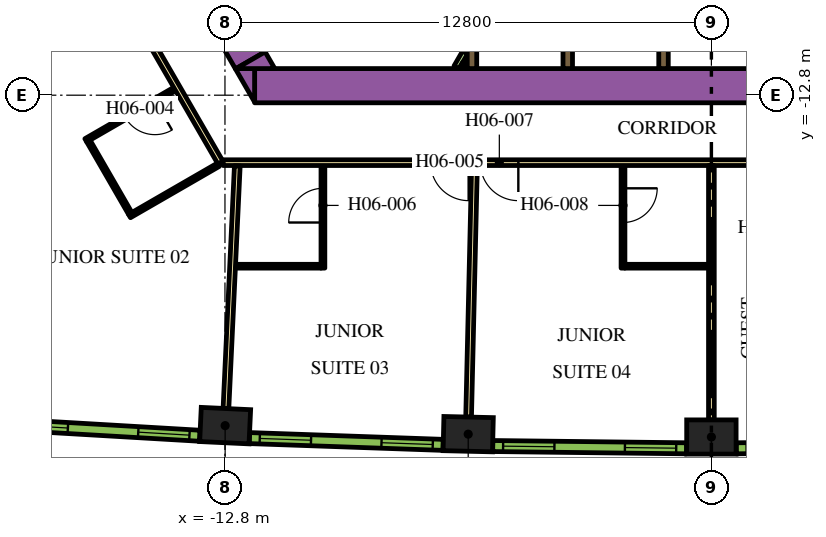
"""IFC4 building model, lengths in metres.
Left out: names, types, materials, properties, quantities, classifications, styles, units other than length and angle.
Written with IfcOpenShell. Run it as: python <this file> out.ifc"""

import sys

from ifc_helpers import new_model, si_unit, direction, frame, frame_2d, origin, origin_2d, place, context, subcontext, project, spatial, polyline, rectangle, outline, extrude, element, fill, save


model = new_model("IFC4")
c1 = context("Model", 3, precision=1e-05, world=origin(), true_north=direction((0.0, 1.0)))
c2 = subcontext(c1, "Body", "Model", "MODEL_VIEW")
j1 = project(units=[si_unit("LENGTHUNIT", "METRE"), si_unit("PLANEANGLEUNIT", "RADIAN")], contexts=[c1])
p1 = place(None, origin())
s1 = spatial("IfcSite", under=j1, at=p1, CompositionType="ELEMENT")
p2 = place(p1, origin())
s2 = spatial("IfcBuilding", under=s1, at=p2, CompositionType="ELEMENT")
p3 = place(p2, frame((0.0, 0.0, 91.5)))
s3 = spatial("IfcBuildingStorey", under=s2, at=p3, CompositionType="ELEMENT", Elevation=91.5)
for number, where, z_axis, x_axis in (
    (1, (-12.795, -21.494, 0.0), (0.0, 0.0, 1.0), (0.999, -0.047, 0.0)),
    (2, (-6.399, -21.719, 0.0), (0.0, 0.0, 1.0), (1.0, -0.023, 0.0)),
    (3, (0.0, -21.794, 0.0), (0.0, 0.0, 1.0), (1.0, 0.0, 0.0)),
):
    element("IfcColumn", number, at=place(p3, frame(where, z_axis=z_axis, x_axis=x_axis)), inside=s3, PredefinedType="COLUMN", context=c2, shape_type="SweptSolid", body=[
        extrude(rectangle(XDim=1.3, YDim=0.9, at=origin_2d()), origin(), (0.0, 0.0, 1.0), 3.9),
    ])
p4 = place(p3, frame((-12.019, -12.55, 0.0), z_axis=(0.0, 0.0, 1.0), x_axis=(1.0, 0.0, 0.0)))
e4 = element("IfcWall", 4, at=p4, inside=s3, PredefinedType="SOLIDWALL", context=c2, shape_type="SweptSolid", body=[
    extrude(rectangle(XDim=21.63, YDim=0.9, at=frame_2d((10.815, 0.0))), origin(), (0.0, 0.0, 1.0), 3.9),
])
p5 = place(p3, origin())
e5 = element("IfcWall", 5, at=p5, inside=s3, PredefinedType="SOLIDWALL", context=c2, shape_type="SweptSolid", body=[
    extrude(outline(polyline([(-12.529, -12.1), (-12.021, -12.1), (-12.021, -12.98), (-12.529, -12.1)])), origin(), (0.0, 0.0, 1.0), 3.9),
])
p6 = place(p3, frame((-12.134, -11.883, 0.0), z_axis=(0.0, 0.0, 1.0), x_axis=(-0.500005339912, 0.866022320763, 0.0)))
e6 = element("IfcWall", 6, at=p6, inside=s3, PredefinedType="SOLIDWALL", context=c2, shape_type="SweptSolid", body=[
    extrude(rectangle(XDim=9.488, YDim=0.9, at=frame_2d((4.744, 0.0))), origin(), (0.0, 0.0, 1.0), 3.9),
])
e7 = element("IfcWall", 7, at=p5, inside=s3, PredefinedType="SOLIDWALL", context=c2, shape_type="SweptSolid", body=[
    extrude(outline(polyline([(-11.489, -12.1), (-12.505, -12.1), (-11.743, -11.66), (-11.489, -12.1)])), origin(), (0.0, 0.0, 1.0), 3.9),
])
p7 = place(p3, frame((-3.78, -12.1, 0.0), z_axis=(0.0, 0.0, 1.0), x_axis=(0.0, 1.0, 0.0)))
e8 = element("IfcWall", 8, at=p7, inside=s3, PredefinedType="SOLIDWALL", context=c2, shape_type="SweptSolid", body=[
    extrude(rectangle(XDim=2.2, YDim=0.25, at=frame_2d((1.1, 0.0))), origin(), (0.0, 0.0, 1.0), 3.9),
])
p8 = place(p3, frame((-6.3, -12.1, 0.0), z_axis=(0.0, 0.0, 1.0), x_axis=(0.0, 1.0, 0.0)))
e9 = element("IfcWall", 9, at=p8, inside=s3, PredefinedType="SOLIDWALL", context=c2, shape_type="SweptSolid", body=[
    extrude(rectangle(XDim=3.146, YDim=0.25, at=frame_2d((1.573, 0.0))), origin(), (0.0, 0.0, 1.0), 3.9),
])
p9 = place(p3, frame((-1.26, -12.1, 0.0), z_axis=(0.0, 0.0, 1.0), x_axis=(0.0, 1.0, 0.0)))
e10 = element("IfcWall", 10, at=p9, inside=s3, PredefinedType="SOLIDWALL", context=c2, shape_type="SweptSolid", body=[
    extrude(rectangle(XDim=2.2, YDim=0.25, at=frame_2d((1.1, 0.0))), origin(), (0.0, 0.0, 1.0), 3.9),
])
p10 = place(p3, frame((-6.708, -12.068, 0.0), z_axis=(0.0, 0.0, 1.0), x_axis=(0.500000789788, 0.8660249478, 0.0)))
e11 = element("IfcWall", 11, at=p10, inside=s3, PredefinedType="PARTITIONING", context=c2, shape_type="SweptSolid", body=[
    extrude(rectangle(XDim=0.456, YDim=0.15, at=frame_2d((0.228, 0.0))), origin(), (0.0, 0.0, 1.0), 2.75),
])
p11 = place(p3, frame((-6.534, -12.068, 0.0), z_axis=(0.0, 0.0, 1.0), x_axis=(0.500240224089, 0.865886665912, 0.0)))
e12 = element("IfcWall", 12, at=p11, inside=s3, PredefinedType="PARTITIONING", context=c2, shape_type="SweptSolid", body=[
    extrude(rectangle(XDim=0.109, YDim=0.15, at=frame_2d((0.054, 0.0))), origin(), (0.0, 0.0, 1.0), 2.75),
])
p12 = place(p3, frame((-28.211, -15.335, 0.0), z_axis=(0.0, 0.0, 1.0), x_axis=(0.866025884867, 0.49999916674, 0.0)))
e13 = element("IfcWall", 13, at=p12, inside=s3, PredefinedType="PARTITIONING", context=c2, shape_type="SweptSolid", body=[
    extrude(rectangle(XDim=13.543, YDim=0.15, at=frame_2d((6.772, 0.0))), origin(), (0.0, 0.0, 1.0), 2.75),
])
p13 = place(p12, frame((12.214, 0.0, 0.0)))
e14 = element("IfcOpeningElement", 14, at=p13, cuts=e13, PredefinedType="OPENING", context=c2, shape_type="SweptSolid", body=[
    extrude(rectangle(XDim=1.0, YDim=2.1, at=frame_2d((0.5, 1.05))), frame((0.0, 0.085, 0.0), z_axis=(0.0, -1.0, 0.0), x_axis=(1.0, 0.0, 0.0)), (0.0, 0.0, 1.0), 0.17),
])
p14 = place(p12, frame((8.488, 0.0, 0.0)))
e15 = element("IfcOpeningElement", 15, at=p14, cuts=e13, PredefinedType="OPENING", context=c2, shape_type="SweptSolid", body=[
    extrude(rectangle(XDim=1.0, YDim=2.1, at=frame_2d((0.5, 1.05))), frame((0.0, 0.085, 0.0), z_axis=(0.0, -1.0, 0.0), x_axis=(1.0, 0.0, 0.0)), (0.0, 0.0, 1.0), 0.17),
])
p15 = place(p3, frame((-15.587, -9.952, 0.0), z_axis=(0.0, 0.0, 1.0), x_axis=(-0.866017869832, -0.500013048961, 0.0)))
e16 = element("IfcWall", 16, at=p15, inside=s3, PredefinedType="PARTITIONING", context=c2, shape_type="SweptSolid", body=[
    extrude(rectangle(XDim=13.624, YDim=0.15, at=frame_2d((6.812, 0.0))), origin(), (0.0, 0.0, 1.0), 2.75),
])
p16 = place(p15, frame((4.134, 0.0, 0.0)))
e17 = element("IfcOpeningElement", 17, at=p16, cuts=e16, PredefinedType="OPENING", context=c2, shape_type="SweptSolid", body=[
    extrude(rectangle(XDim=1.0, YDim=2.1, at=frame_2d((0.5, 1.05))), frame((0.0, 0.085, 0.0), z_axis=(0.0, -1.0, 0.0), x_axis=(1.0, 0.0, 0.0)), (0.0, 0.0, 1.0), 0.17),
])
p17 = place(p3, frame((-12.918, -14.575, 0.0), z_axis=(0.0, 0.0, 1.0), x_axis=(-0.500009150678, 0.866020120573, 0.0)))
e18 = element("IfcWall", 18, at=p17, inside=s3, PredefinedType="PARTITIONING", context=c2, shape_type="SweptSolid", body=[
    extrude(rectangle(XDim=5.258, YDim=0.15, at=frame_2d((2.629, 0.0))), origin(), (0.0, 0.0, 1.0), 2.75),
])
p18 = place(p17, frame((4.078, 0.0, 0.0)))
e19 = element("IfcOpeningElement", 19, at=p18, cuts=e18, PredefinedType="OPENING", context=c2, shape_type="SweptSolid", body=[
    extrude(rectangle(XDim=1.0, YDim=2.1, at=frame_2d((0.5, 1.05))), frame((0.0, 0.085, 0.0), z_axis=(0.0, -1.0, 0.0), x_axis=(1.0, 0.0, 0.0)), (0.0, 0.0, 1.0), 0.17),
])
p19 = place(p3, frame((12.918, -14.575, 0.0), z_axis=(0.0, 0.0, 1.0), x_axis=(-1.0, 0.0, 0.0)))
e20 = element("IfcWall", 20, at=p19, inside=s3, PredefinedType="PARTITIONING", context=c2, shape_type="SweptSolid", body=[
    extrude(rectangle(XDim=25.766, YDim=0.15, at=frame_2d((12.883, 0.0))), origin(), (0.0, 0.0, 1.0), 2.75),
])
p20 = place(p19, frame((19.306, 0.0, 0.0)))
e21 = element("IfcOpeningElement", 21, at=p20, cuts=e20, PredefinedType="OPENING", context=c2, shape_type="SweptSolid", body=[
    extrude(rectangle(XDim=1.0, YDim=2.1, at=frame_2d((0.5, 1.05))), frame((0.0, 0.085, 0.0), z_axis=(0.0, -1.0, 0.0), x_axis=(1.0, 0.0, 0.0)), (0.0, 0.0, 1.0), 0.17),
])
p21 = place(p19, frame((17.999, 0.0, 0.0)))
e22 = element("IfcOpeningElement", 22, at=p21, cuts=e20, PredefinedType="OPENING", context=c2, shape_type="SweptSolid", body=[
    extrude(rectangle(XDim=1.0, YDim=2.1, at=frame_2d((0.5, 1.05))), frame((0.0, 0.085, 0.0), z_axis=(0.0, -1.0, 0.0), x_axis=(1.0, 0.0, 0.0)), (0.0, 0.0, 1.0), 0.17),
])
p22 = place(p19, frame((10.874, 0.0, 0.0)))
e23 = element("IfcOpeningElement", 23, at=p22, cuts=e20, PredefinedType="OPENING", context=c2, shape_type="SweptSolid", body=[
    extrude(rectangle(XDim=0.9, YDim=2.1, at=frame_2d((0.45, 1.05))), frame((0.0, 0.085, 0.0), z_axis=(0.0, -1.0, 0.0), x_axis=(1.0, 0.0, 0.0)), (0.0, 0.0, 1.0), 0.17),
])
p23 = place(p19, frame((8.647, 0.0, 0.0)))
e24 = element("IfcOpeningElement", 24, at=p23, cuts=e20, PredefinedType="OPENING", context=c2, shape_type="SweptSolid", body=[
    extrude(rectangle(XDim=1.0, YDim=2.1, at=frame_2d((0.5, 1.05))), frame((0.0, 0.085, 0.0), z_axis=(0.0, -1.0, 0.0), x_axis=(1.0, 0.0, 0.0)), (0.0, 0.0, 1.0), 0.17),
])
p24 = place(p19, frame((0.18, 0.0, 0.0)))
e25 = element("IfcOpeningElement", 25, at=p24, cuts=e20, PredefinedType="OPENING", context=c2, shape_type="SweptSolid", body=[
    extrude(rectangle(XDim=1.0, YDim=2.1, at=frame_2d((0.5, 1.05))), frame((0.0, 0.085, 0.0), z_axis=(0.0, -1.0, 0.0), x_axis=(1.0, 0.0, 0.0)), (0.0, 0.0, 1.0), 0.17),
])
p25 = place(p3, frame((-12.774, -21.045, 0.0), z_axis=(0.0, 0.0, 1.0), x_axis=(0.046750341626, 0.998906605023, 0.0)))
e26 = element("IfcWall", 26, at=p25, inside=s3, PredefinedType="PARTITIONING", context=c2, shape_type="SweptSolid", body=[
    extrude(rectangle(XDim=6.392, YDim=0.15, at=frame_2d((3.196, 0.0))), origin(), (0.0, 0.0, 1.0), 2.75),
])
p26 = place(p3, frame((-6.389, -21.269, 0.0), z_axis=(0.0, 0.0, 1.0), x_axis=(0.023377429176, 0.999726710559, 0.0)))
e27 = element("IfcWall", 27, at=p26, inside=s3, PredefinedType="PARTITIONING", context=c2, shape_type="SweptSolid", body=[
    extrude(rectangle(XDim=6.611, YDim=0.15, at=frame_2d((3.305, 0.0))), origin(), (0.0, 0.0, 1.0), 2.75),
])
p27 = place(p3, frame((0.0, -21.344, 0.0), z_axis=(0.0, 0.0, 1.0), x_axis=(0.0, 1.0, 0.0)))
e28 = element("IfcWall", 28, at=p27, inside=s3, PredefinedType="PARTITIONING", context=c2, shape_type="SweptSolid", body=[
    extrude(rectangle(XDim=6.694, YDim=0.15, at=frame_2d((3.347, 0.0))), origin(), (0.0, 0.0, 1.0), 2.75),
])
p28 = place(p3, frame((-14.123, -12.638, 0.0), z_axis=(0.0, 0.0, 1.0), x_axis=(-0.86599734893, -0.500048589285, 0.0)))
e29 = element("IfcWall", 29, at=p28, inside=s3, PredefinedType="PARTITIONING", context=c2, shape_type="SweptSolid", body=[
    extrude(rectangle(XDim=2.7, YDim=0.1, at=frame_2d((1.35, 0.0))), origin(), (0.0, 0.0, 1.0), 2.75),
])
p29 = place(p28, frame((0.6, 0.0, 0.0)))
e30 = element("IfcOpeningElement", 30, at=p29, cuts=e29, PredefinedType="OPENING", context=c2, shape_type="SweptSolid", body=[
    extrude(rectangle(XDim=0.9, YDim=2.1, at=frame_2d((0.45, 1.05))), frame((0.0, 0.06, 0.0), z_axis=(0.0, -1.0, 0.0), x_axis=(1.0, 0.0, 0.0)), (0.0, 0.0, 1.0), 0.12),
])
p30 = place(p3, frame((-16.393, -14.006, 0.0), z_axis=(0.0, 0.0, 1.0), x_axis=(0.499946605688, -0.86605622881, 0.0)))
e31 = element("IfcWall", 31, at=p30, inside=s3, PredefinedType="PARTITIONING", context=c2, shape_type="SweptSolid", body=[
    extrude(rectangle(XDim=2.2, YDim=0.1, at=frame_2d((1.1, 0.0))), origin(), (0.0, 0.0, 1.0), 2.75),
])
p31 = place(p3, frame((-12.973, -14.63, 0.0), z_axis=(0.0, 0.0, 1.0), x_axis=(-0.866036505625, -0.499980770555, 0.0)))
e32 = element("IfcWall", 32, at=p31, inside=s3, PredefinedType="PARTITIONING", context=c2, shape_type="SweptSolid", body=[
    extrude(rectangle(XDim=2.7, YDim=0.1, at=frame_2d((1.35, 0.0))), origin(), (0.0, 0.0, 1.0), 2.75),
])
p32 = place(p3, frame((-10.222, -17.35, 0.0), z_axis=(0.0, 0.0, 1.0), x_axis=(0.0, 1.0, 0.0)))
e33 = element("IfcWall", 33, at=p32, inside=s3, PredefinedType="PARTITIONING", context=c2, shape_type="SweptSolid", body=[
    extrude(rectangle(XDim=2.7, YDim=0.1, at=frame_2d((1.35, 0.0))), origin(), (0.0, 0.0, 1.0), 2.75),
])
p33 = place(p32, frame((1.2, 0.0, 0.0)))
e34 = element("IfcOpeningElement", 34, at=p33, cuts=e33, PredefinedType="OPENING", context=c2, shape_type="SweptSolid", body=[
    extrude(rectangle(XDim=0.9, YDim=2.1, at=frame_2d((0.45, 1.05))), frame((0.0, 0.06, 0.0), z_axis=(0.0, -1.0, 0.0), x_axis=(1.0, 0.0, 0.0)), (0.0, 0.0, 1.0), 0.12),
])
p34 = place(p3, frame((-10.272, -17.3, 0.0), z_axis=(0.0, 0.0, 1.0), x_axis=(-1.0, 0.0, 0.0)))
e35 = element("IfcWall", 35, at=p34, inside=s3, PredefinedType="PARTITIONING", context=c2, shape_type="SweptSolid", body=[
    extrude(rectangle(XDim=2.25, YDim=0.1, at=frame_2d((1.125, 0.0))), origin(), (0.0, 0.0, 1.0), 2.75),
])
p35 = place(p3, frame((-2.326, -14.65, 0.0), z_axis=(0.0, 0.0, 1.0), x_axis=(0.0, -1.0, 0.0)))
e36 = element("IfcWall", 36, at=p35, inside=s3, PredefinedType="PARTITIONING", context=c2, shape_type="SweptSolid", body=[
    extrude(rectangle(XDim=2.7, YDim=0.1, at=frame_2d((1.35, 0.0))), origin(), (0.0, 0.0, 1.0), 2.75),
])
p36 = place(p35, frame((0.6, 0.0, 0.0)))
e37 = element("IfcOpeningElement", 37, at=p36, cuts=e36, PredefinedType="OPENING", context=c2, shape_type="SweptSolid", body=[
    extrude(rectangle(XDim=0.9, YDim=2.1, at=frame_2d((0.45, 1.05))), frame((0.0, 0.06, 0.0), z_axis=(0.0, -1.0, 0.0), x_axis=(1.0, 0.0, 0.0)), (0.0, 0.0, 1.0), 0.12),
])
p37 = place(p3, frame((-2.276, -17.3, 0.0), z_axis=(0.0, 0.0, 1.0), x_axis=(1.0, 0.0, 0.0)))
e38 = element("IfcWall", 38, at=p37, inside=s3, PredefinedType="PARTITIONING", context=c2, shape_type="SweptSolid", body=[
    extrude(rectangle(XDim=2.2, YDim=0.1, at=frame_2d((1.1, 0.0))), origin(), (0.0, 0.0, 1.0), 2.75),
])
p38 = place(p3, frame((-18.553, -21.463, 0.0), z_axis=(0.0, 0.0, 1.0), x_axis=(0.998290511436, -0.058447025388, 0.0)))
e39 = element("IfcWall", 39, at=p38, inside=s3, PredefinedType="SOLIDWALL", context=c2, shape_type="SweptSolid", body=[
    extrude(rectangle(XDim=5.1, YDim=0.29, at=frame_2d((2.55, 0.0))), origin(), (0.0, 0.0, 1.0), 3.65),
])
p39 = place(p38, frame((0.273, 0.0, 0.9)))
e40 = element("IfcOpeningElement", 40, at=p39, cuts=e39, PredefinedType="OPENING", context=c2, shape_type="SweptSolid", body=[
    extrude(rectangle(XDim=1.35, YDim=2.15, at=frame_2d((0.675, 1.075))), frame((0.0, 0.155, 0.0), z_axis=(0.0, -1.0, 0.0), x_axis=(1.0, 0.0, 0.0)), (0.0, 0.0, 1.0), 0.31),
])
p40 = place(p38, frame((3.478, 0.0, 0.9)))
e41 = element("IfcOpeningElement", 41, at=p40, cuts=e39, PredefinedType="OPENING", context=c2, shape_type="SweptSolid", body=[
    extrude(rectangle(XDim=1.35, YDim=2.15, at=frame_2d((0.675, 1.075))), frame((0.0, 0.155, 0.0), z_axis=(0.0, -1.0, 0.0), x_axis=(1.0, 0.0, 0.0)), (0.0, 0.0, 1.0), 0.31),
])
p41 = place(p3, frame((-12.157, -21.822, 0.0), z_axis=(0.0, 0.0, 1.0), x_axis=(0.999385993957, -0.035037623812, 0.0)))
e42 = element("IfcWall", 42, at=p41, inside=s3, PredefinedType="SOLIDWALL", context=c2, shape_type="SweptSolid", body=[
    extrude(rectangle(XDim=5.101, YDim=0.29, at=frame_2d((2.55, 0.0))), origin(), (0.0, 0.0, 1.0), 3.65),
])
p42 = place(p41, frame((0.273, 0.0, 0.9)))
e43 = element("IfcOpeningElement", 43, at=p42, cuts=e42, PredefinedType="OPENING", context=c2, shape_type="SweptSolid", body=[
    extrude(rectangle(XDim=1.35, YDim=2.15, at=frame_2d((0.675, 1.075))), frame((0.0, 0.155, 0.0), z_axis=(0.0, -1.0, 0.0), x_axis=(1.0, 0.0, 0.0)), (0.0, 0.0, 1.0), 0.31),
])
p43 = place(p41, frame((3.478, 0.0, 0.9)))
e44 = element("IfcOpeningElement", 44, at=p43, cuts=e42, PredefinedType="OPENING", context=c2, shape_type="SweptSolid", body=[
    extrude(rectangle(XDim=1.35, YDim=2.15, at=frame_2d((0.675, 1.075))), frame((0.0, 0.155, 0.0), z_axis=(0.0, -1.0, 0.0), x_axis=(1.0, 0.0, 0.0)), (0.0, 0.0, 1.0), 0.31),
])
p44 = place(p3, frame((-5.753, -22.031, 0.0), z_axis=(0.0, 0.0, 1.0), x_axis=(0.999931786565, -0.011679992145, 0.0)))
e45 = element("IfcWall", 45, at=p44, inside=s3, PredefinedType="SOLIDWALL", context=c2, shape_type="SweptSolid", body=[
    extrude(rectangle(XDim=5.1, YDim=0.29, at=frame_2d((2.55, 0.0))), origin(), (0.0, 0.0, 1.0), 3.65),
])
p45 = place(p44, frame((0.272, 0.0, 0.9)))
e46 = element("IfcOpeningElement", 46, at=p45, cuts=e45, PredefinedType="OPENING", context=c2, shape_type="SweptSolid", body=[
    extrude(rectangle(XDim=1.35, YDim=2.15, at=frame_2d((0.675, 1.075))), frame((0.0, 0.155, 0.0), z_axis=(0.0, -1.0, 0.0), x_axis=(1.0, 0.0, 0.0)), (0.0, 0.0, 1.0), 0.31),
])
p46 = place(p44, frame((3.478, 0.0, 0.9)))
e47 = element("IfcOpeningElement", 47, at=p46, cuts=e45, PredefinedType="OPENING", context=c2, shape_type="SweptSolid", body=[
    extrude(rectangle(XDim=1.35, YDim=2.15, at=frame_2d((0.675, 1.075))), frame((0.0, 0.155, 0.0), z_axis=(0.0, -1.0, 0.0), x_axis=(1.0, 0.0, 0.0)), (0.0, 0.0, 1.0), 0.31),
])
p47 = place(p3, frame((0.653, -22.091, 0.0), z_axis=(0.0, 0.0, 1.0), x_axis=(0.999931786565, 0.011679992145, 0.0)))
e48 = element("IfcWall", 48, at=p47, inside=s3, PredefinedType="SOLIDWALL", context=c2, shape_type="SweptSolid", body=[
    extrude(rectangle(XDim=5.1, YDim=0.29, at=frame_2d((2.55, 0.0))), origin(), (0.0, 0.0, 1.0), 3.65),
])
p48 = place(p47, frame((0.273, 0.0, 0.9)))
e49 = element("IfcOpeningElement", 49, at=p48, cuts=e48, PredefinedType="OPENING", context=c2, shape_type="SweptSolid", body=[
    extrude(rectangle(XDim=1.35, YDim=2.15, at=frame_2d((0.675, 1.075))), frame((0.0, 0.155, 0.0), z_axis=(0.0, -1.0, 0.0), x_axis=(1.0, 0.0, 0.0)), (0.0, 0.0, 1.0), 0.31),
])
p49 = place(p47, frame((3.478, 0.0, 0.9)))
e50 = element("IfcOpeningElement", 50, at=p49, cuts=e48, PredefinedType="OPENING", context=c2, shape_type="SweptSolid", body=[
    extrude(rectangle(XDim=1.35, YDim=2.15, at=frame_2d((0.675, 1.075))), frame((0.0, 0.155, 0.0), z_axis=(0.0, -1.0, 0.0), x_axis=(1.0, 0.0, 0.0)), (0.0, 0.0, 1.0), 0.31),
])
p50 = place(p29, origin())
e51 = element("IfcDoor", 51, at=p50, inside=s3, OperationType="SINGLE_SWING_LEFT", PredefinedType="DOOR", context=c2, shape_type="SweptSolid", body=[
    extrude(rectangle(XDim=0.9, YDim=2.1, at=frame_2d((0.45, 1.05))), frame((0.0, 0.025, 0.0), z_axis=(0.0, -1.0, 0.0), x_axis=(1.0, 0.0, 0.0)), (0.0, 0.0, 1.0), 0.05),
])
fill(e30, e51)
p51 = place(p20, origin())
e52 = element("IfcDoor", 52, at=p51, inside=s3, OperationType="SINGLE_SWING_LEFT", PredefinedType="DOOR", context=c2, shape_type="SweptSolid", body=[
    extrude(rectangle(XDim=1.0, YDim=2.1, at=frame_2d((0.5, 1.05))), frame((0.0, 0.025, 0.0), z_axis=(0.0, -1.0, 0.0), x_axis=(1.0, 0.0, 0.0)), (0.0, 0.0, 1.0), 0.05),
])
fill(e21, e52)
p52 = place(p33, origin())
e53 = element("IfcDoor", 53, at=p52, inside=s3, OperationType="SINGLE_SWING_RIGHT", PredefinedType="DOOR", context=c2, shape_type="SweptSolid", body=[
    extrude(rectangle(XDim=0.9, YDim=2.1, at=frame_2d((0.45, 1.05))), frame((0.0, 0.025, 0.0), z_axis=(0.0, -1.0, 0.0), x_axis=(1.0, 0.0, 0.0)), (0.0, 0.0, 1.0), 0.05),
])
fill(e34, e53)
p53 = place(p21, origin())
e54 = element("IfcDoor", 54, at=p53, inside=s3, OperationType="SINGLE_SWING_RIGHT", PredefinedType="DOOR", context=c2, shape_type="SweptSolid", body=[
    extrude(rectangle(XDim=1.0, YDim=2.1, at=frame_2d((0.5, 1.05))), frame((0.0, 0.025, 0.0), z_axis=(0.0, -1.0, 0.0), x_axis=(1.0, 0.0, 0.0)), (0.0, 0.0, 1.0), 0.05),
])
fill(e22, e54)
p54 = place(p36, origin())
e55 = element("IfcDoor", 55, at=p54, inside=s3, OperationType="SINGLE_SWING_LEFT", PredefinedType="DOOR", context=c2, shape_type="SweptSolid", body=[
    extrude(rectangle(XDim=0.9, YDim=2.1, at=frame_2d((0.45, 1.05))), frame((0.0, 0.025, 0.0), z_axis=(0.0, -1.0, 0.0), x_axis=(1.0, 0.0, 0.0)), (0.0, 0.0, 1.0), 0.05),
])
fill(e37, e55)
p55 = place(p39, origin())
e56 = element("IfcWindow", 56, at=p55, inside=s3, PartitioningType="DOUBLE_PANEL_VERTICAL", PredefinedType="WINDOW", context=c2, shape_type="SweptSolid", body=[
    extrude(rectangle(XDim=1.35, YDim=2.15, at=frame_2d((0.675, 1.075))), frame((0.0, 0.015, 0.0), z_axis=(0.0, -1.0, 0.0), x_axis=(1.0, 0.0, 0.0)), (0.0, 0.0, 1.0), 0.06),
])
fill(e40, e56)
p56 = place(p40, origin())
e57 = element("IfcWindow", 57, at=p56, inside=s3, PartitioningType="DOUBLE_PANEL_VERTICAL", PredefinedType="WINDOW", context=c2, shape_type="SweptSolid", body=[
    extrude(rectangle(XDim=1.35, YDim=2.15, at=frame_2d((0.675, 1.075))), frame((0.0, 0.015, 0.0), z_axis=(0.0, -1.0, 0.0), x_axis=(1.0, 0.0, 0.0)), (0.0, 0.0, 1.0), 0.06),
])
fill(e41, e57)
p57 = place(p42, origin())
e58 = element("IfcWindow", 58, at=p57, inside=s3, PartitioningType="DOUBLE_PANEL_VERTICAL", PredefinedType="WINDOW", context=c2, shape_type="SweptSolid", body=[
    extrude(rectangle(XDim=1.35, YDim=2.15, at=frame_2d((0.675, 1.075))), frame((0.0, 0.015, 0.0), z_axis=(0.0, -1.0, 0.0), x_axis=(1.0, 0.0, 0.0)), (0.0, 0.0, 1.0), 0.06),
])
fill(e43, e58)
p58 = place(p43, origin())
e59 = element("IfcWindow", 59, at=p58, inside=s3, PartitioningType="DOUBLE_PANEL_VERTICAL", PredefinedType="WINDOW", context=c2, shape_type="SweptSolid", body=[
    extrude(rectangle(XDim=1.35, YDim=2.15, at=frame_2d((0.675, 1.075))), frame((0.0, 0.015, 0.0), z_axis=(0.0, -1.0, 0.0), x_axis=(1.0, 0.0, 0.0)), (0.0, 0.0, 1.0), 0.06),
])
fill(e44, e59)
p59 = place(p45, origin())
e60 = element("IfcWindow", 60, at=p59, inside=s3, PartitioningType="DOUBLE_PANEL_VERTICAL", PredefinedType="WINDOW", context=c2, shape_type="SweptSolid", body=[
    extrude(rectangle(XDim=1.35, YDim=2.15, at=frame_2d((0.675, 1.075))), frame((0.0, 0.015, 0.0), z_axis=(0.0, -1.0, 0.0), x_axis=(1.0, 0.0, 0.0)), (0.0, 0.0, 1.0), 0.06),
])
fill(e46, e60)
p60 = place(p46, origin())
e61 = element("IfcWindow", 61, at=p60, inside=s3, PartitioningType="DOUBLE_PANEL_VERTICAL", PredefinedType="WINDOW", context=c2, shape_type="SweptSolid", body=[
    extrude(rectangle(XDim=1.35, YDim=2.15, at=frame_2d((0.675, 1.075))), frame((0.0, 0.015, 0.0), z_axis=(0.0, -1.0, 0.0), x_axis=(1.0, 0.0, 0.0)), (0.0, 0.0, 1.0), 0.06),
])
fill(e47, e61)
save(model, sys.argv[1])
